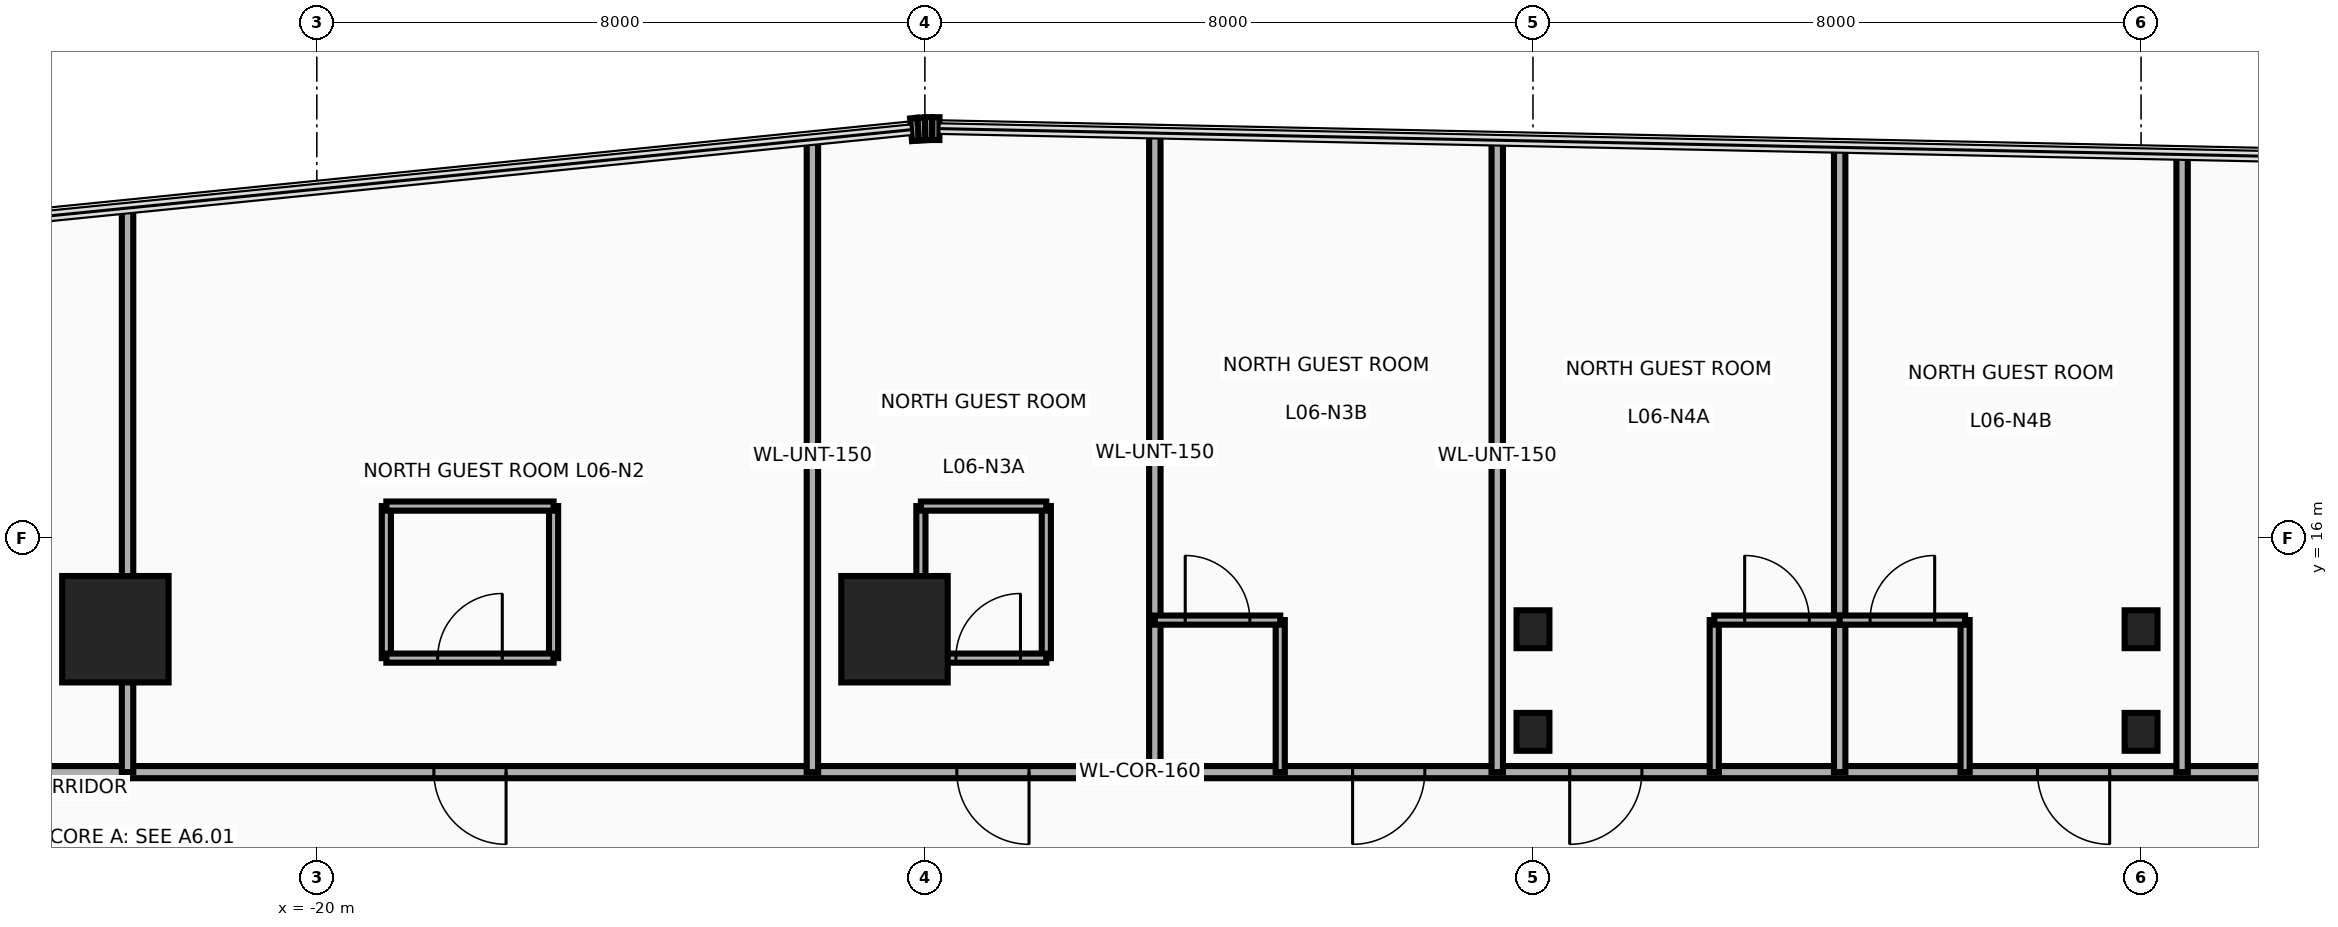
"""IFC4 building model, lengths in metres.
Left out: names, types, materials, properties, quantities, classifications, styles, units other than length and angle.
Written with IfcOpenShell. Run it as: python <this file> out.ifc"""

import sys

from ifc_helpers import new_model, si_unit, direction, frame, frame_2d, origin, origin_2d, place, context, subcontext, project, spatial, rectangle, i_section, extrude, source, transform, mapped, element, fill, save


model = new_model("IFC4")
c1 = context("Model", 3, precision=1e-05, world=origin(), true_north=direction((0.0, 1.0)))
c2 = subcontext(c1, "Body", "Model", "MODEL_VIEW")
j1 = project(units=[si_unit("LENGTHUNIT", "METRE"), si_unit("PLANEANGLEUNIT", "RADIAN")], contexts=[c1])
p1 = place(None, origin())
s1 = spatial("IfcSite", under=j1, at=p1, CompositionType="ELEMENT")
p2 = place(p1, origin())
s2 = spatial("IfcBuilding", under=s1, at=p2, CompositionType="ELEMENT")
p3 = place(p2, frame((0.0, 0.0, 29.7)))
s3 = spatial("IfcBuildingStorey", under=s2, at=p3, CompositionType="ELEMENT", Elevation=29.7)
m1 = source(origin(), c2, "Body", "SweptSolid", [
    extrude(rectangle(XDim=1.4, YDim=1.4, at=origin_2d()), origin(), (0.0, 0.0, 1.0), 3.7),
])
for number, where, z_axis, x_axis in (
    (1, (-22.65, 14.8, 0.0), (0.0, 0.0, 1.0), (1.0, 0.0, 0.0)),
    (2, (-12.4, 14.8, 0.0), (0.0, 0.0, 1.0), (1.0, 0.0, 0.0)),
):
    element("IfcColumn", number, at=place(p3, frame(where, z_axis=z_axis, x_axis=x_axis)), inside=s3, PredefinedType="COLUMN", context=c2, shape_type="MappedRepresentation", body=[
        mapped(m1, transform((0.0, 0.0, 0.0), x_axis=(1.0, 0.0, 0.0), y_axis=(0.0, 1.0, 0.0), z_axis=(0.0, 0.0, 1.0), scale=1.0)),
    ])
m2 = source(origin(), c2, "Body", "SweptSolid", [
    extrude(i_section(OverallWidth=0.432, OverallDepth=0.498, WebThickness=0.056, FlangeThickness=0.089, at=origin_2d()), origin(), (0.0, 0.0, 1.0), 3.7),
])
for number, where, z_axis, x_axis in (
    (3, (-4.0, 13.45, 0.0), (0.0, 0.0, 1.0), (1.0, 0.0, 0.0)),
    (4, (-4.0, 14.8, 0.0), (0.0, 0.0, 1.0), (1.0, 0.0, 0.0)),
    (5, (4.0, 13.45, 0.0), (0.0, 0.0, 1.0), (1.0, 0.0, 0.0)),
    (6, (4.0, 14.8, 0.0), (0.0, 0.0, 1.0), (1.0, 0.0, 0.0)),
):
    element("IfcColumn", number, at=place(p3, frame(where, z_axis=z_axis, x_axis=x_axis)), inside=s3, PredefinedType="COLUMN", context=c2, shape_type="MappedRepresentation", body=[
        mapped(m2, transform((0.0, 0.0, 0.0), x_axis=(1.0, 0.0, 0.0), y_axis=(0.0, 1.0, 0.0), z_axis=(0.0, 0.0, 1.0), scale=1.0)),
    ])
p4 = place(p3, frame((-12.182, 21.371, 0.0), z_axis=(0.0, 0.0, 1.0), x_axis=(0.996527790842, 0.08326080759, 0.0)))
e7 = element("IfcWall", 7, at=p4, inside=s3, PredefinedType="SOLIDWALL", context=c2, shape_type="SweptSolid", body=[
    extrude(rectangle(XDim=0.094, YDim=0.3, at=frame_2d((0.047, 0.0))), origin(), (0.0, 0.0, 1.0), 3.46),
])
p5 = place(p3, frame((-12.088, 21.379, 0.0), z_axis=(0.0, 0.0, 1.0), x_axis=(0.998476480444, 0.055178963393, 0.0)))
e8 = element("IfcWall", 8, at=p5, inside=s3, PredefinedType="SOLIDWALL", context=c2, shape_type="SweptSolid", body=[
    extrude(rectangle(XDim=0.093, YDim=0.3, at=frame_2d((0.046, 0.0))), origin(), (0.0, 0.0, 1.0), 3.46),
])
p6 = place(p3, frame((-11.996, 21.384, 0.0), z_axis=(0.0, 0.0, 1.0), x_axis=(0.999722573757, 0.023553673204, 0.0)))
e9 = element("IfcWall", 9, at=p6, inside=s3, PredefinedType="SOLIDWALL", context=c2, shape_type="SweptSolid", body=[
    extrude(rectangle(XDim=0.093, YDim=0.3, at=frame_2d((0.047, 0.0))), origin(), (0.0, 0.0, 1.0), 3.46),
])
p7 = place(p3, frame((-11.902, 21.386, 0.0), z_axis=(0.0, 0.0, 1.0), x_axis=(0.999986507273, -0.005194735103, 0.0)))
e10 = element("IfcWall", 10, at=p7, inside=s3, PredefinedType="SOLIDWALL", context=c2, shape_type="SweptSolid", body=[
    extrude(rectangle(XDim=0.094, YDim=0.3, at=frame_2d((0.047, 0.0))), origin(), (0.0, 0.0, 1.0), 3.46),
])
p8 = place(p3, frame((-31.89, 12.92, 0.0), z_axis=(0.0, 0.0, 1.0), x_axis=(1.0, 0.0, 0.0)))
e11 = element("IfcWall", 11, at=p8, inside=s3, PredefinedType="PARTITIONING", context=c2, shape_type="SweptSolid", body=[
    extrude(rectangle(XDim=45.44, YDim=0.16, at=frame_2d((22.72, 0.0))), origin(), (0.0, 0.0, 1.0), 2.583),
])
p9 = place(p8, frame((4.225, 0.0, 0.0)))
e12 = element("IfcOpeningElement", 12, at=p9, cuts=e11, PredefinedType="OPENING", context=c2, shape_type="SweptSolid", body=[
    extrude(rectangle(XDim=0.95, YDim=2.15, at=frame_2d((0.475, 1.075))), frame((0.0, 0.095, 0.0), z_axis=(0.0, -1.0, 0.0), x_axis=(1.0, 0.0, 0.0)), (0.0, 0.0, 1.0), 0.19),
])
p10 = place(p8, frame((13.43, 0.0, 0.0)))
e13 = element("IfcOpeningElement", 13, at=p10, cuts=e11, PredefinedType="OPENING", context=c2, shape_type="SweptSolid", body=[
    extrude(rectangle(XDim=0.95, YDim=2.15, at=frame_2d((0.475, 1.075))), frame((0.0, 0.095, 0.0), z_axis=(0.0, -1.0, 0.0), x_axis=(1.0, 0.0, 0.0)), (0.0, 0.0, 1.0), 0.19),
])
p11 = place(p8, frame((20.31, 0.0, 0.0)))
e14 = element("IfcOpeningElement", 14, at=p11, cuts=e11, PredefinedType="OPENING", context=c2, shape_type="SweptSolid", body=[
    extrude(rectangle(XDim=0.95, YDim=2.15, at=frame_2d((0.475, 1.075))), frame((0.0, 0.095, 0.0), z_axis=(0.0, -1.0, 0.0), x_axis=(1.0, 0.0, 0.0)), (0.0, 0.0, 1.0), 0.19),
])
p12 = place(p8, frame((25.517, 0.0, 0.0)))
e15 = element("IfcOpeningElement", 15, at=p12, cuts=e11, PredefinedType="OPENING", context=c2, shape_type="SweptSolid", body=[
    extrude(rectangle(XDim=0.95, YDim=2.15, at=frame_2d((0.475, 1.075))), frame((0.0, 0.095, 0.0), z_axis=(0.0, -1.0, 0.0), x_axis=(1.0, 0.0, 0.0)), (0.0, 0.0, 1.0), 0.19),
])
p13 = place(p8, frame((28.373, 0.0, 0.0)))
e16 = element("IfcOpeningElement", 16, at=p13, cuts=e11, PredefinedType="OPENING", context=c2, shape_type="SweptSolid", body=[
    extrude(rectangle(XDim=0.95, YDim=2.15, at=frame_2d((0.475, 1.075))), frame((0.0, 0.095, 0.0), z_axis=(0.0, -1.0, 0.0), x_axis=(1.0, 0.0, 0.0)), (0.0, 0.0, 1.0), 0.19),
])
p14 = place(p8, frame((34.527, 0.0, 0.0)))
e17 = element("IfcOpeningElement", 17, at=p14, cuts=e11, PredefinedType="OPENING", context=c2, shape_type="SweptSolid", body=[
    extrude(rectangle(XDim=0.95, YDim=2.15, at=frame_2d((0.475, 1.075))), frame((0.0, 0.095, 0.0), z_axis=(0.0, -1.0, 0.0), x_axis=(1.0, 0.0, 0.0)), (0.0, 0.0, 1.0), 0.19),
])
p15 = place(p8, frame((39.36, 0.0, 0.0)))
e18 = element("IfcOpeningElement", 18, at=p15, cuts=e11, PredefinedType="OPENING", context=c2, shape_type="SweptSolid", body=[
    extrude(rectangle(XDim=0.95, YDim=2.15, at=frame_2d((0.475, 1.075))), frame((0.0, 0.095, 0.0), z_axis=(0.0, -1.0, 0.0), x_axis=(1.0, 0.0, 0.0)), (0.0, 0.0, 1.0), 0.19),
])
p16 = place(p3, frame((-22.49, 12.92, 0.0), z_axis=(0.0, 0.0, 1.0), x_axis=(0.0, 1.0, 0.0)))
e19 = element("IfcWall", 19, at=p16, inside=s3, PredefinedType="PARTITIONING", context=c2, shape_type="SweptSolid", body=[
    extrude(rectangle(XDim=7.421, YDim=0.15, at=frame_2d((3.71, 0.0))), origin(), (0.0, 0.0, 1.0), 2.583),
])
p17 = place(p3, frame((-13.48, 12.92, 0.0), z_axis=(0.0, 0.0, 1.0), x_axis=(0.0, 1.0, 0.0)))
e20 = element("IfcWall", 20, at=p17, inside=s3, PredefinedType="PARTITIONING", context=c2, shape_type="SweptSolid", body=[
    extrude(rectangle(XDim=8.322, YDim=0.15, at=frame_2d((4.161, 0.0))), origin(), (0.0, 0.0, 1.0), 2.583),
])
p18 = place(p3, frame((-4.47, 12.92, 0.0), z_axis=(0.0, 0.0, 1.0), x_axis=(0.0, 1.0, 0.0)))
e21 = element("IfcWall", 21, at=p18, inside=s3, PredefinedType="PARTITIONING", context=c2, shape_type="SweptSolid", body=[
    extrude(rectangle(XDim=8.313, YDim=0.15, at=frame_2d((4.157, 0.0))), origin(), (0.0, 0.0, 1.0), 2.583),
])
p19 = place(p3, frame((4.54, 12.92, 0.0), z_axis=(0.0, 0.0, 1.0), x_axis=(0.0, 1.0, 0.0)))
e22 = element("IfcWall", 22, at=p19, inside=s3, PredefinedType="PARTITIONING", context=c2, shape_type="SweptSolid", body=[
    extrude(rectangle(XDim=8.125, YDim=0.15, at=frame_2d((4.063, 0.0))), origin(), (0.0, 0.0, 1.0), 2.583),
])
for number, where, z_axis, x_axis in (
    (23, (-19.085, 14.42, 0.0), (0.0, 0.0, 1.0), (0.0, 1.0, 0.0)),
    (24, (-16.885, 14.42, 0.0), (0.0, 0.0, 1.0), (0.0, 1.0, 0.0)),
):
    element("IfcWall", number, at=place(p3, frame(where, z_axis=z_axis, x_axis=x_axis)), inside=s3, PredefinedType="PARTITIONING", context=c2, shape_type="SweptSolid", body=[
        extrude(rectangle(XDim=2.0, YDim=0.12, at=frame_2d((1.0, 0.0))), origin(), (0.0, 0.0, 1.0), 2.583),
    ])
p20 = place(p3, frame((-19.085, 16.42, 0.0), z_axis=(0.0, 0.0, 1.0), x_axis=(1.0, 0.0, 0.0)))
e25 = element("IfcWall", 25, at=p20, inside=s3, PredefinedType="PARTITIONING", context=c2, shape_type="SweptSolid", body=[
    extrude(rectangle(XDim=2.2, YDim=0.12, at=frame_2d((1.1, 0.0))), origin(), (0.0, 0.0, 1.0), 3.46),
])
p21 = place(p3, frame((-19.085, 14.42, 0.0), z_axis=(0.0, 0.0, 1.0), x_axis=(1.0, 0.0, 0.0)))
e26 = element("IfcWall", 26, at=p21, inside=s3, PredefinedType="PARTITIONING", context=c2, shape_type="SweptSolid", body=[
    extrude(rectangle(XDim=2.2, YDim=0.12, at=frame_2d((1.1, 0.0))), origin(), (0.0, 0.0, 1.0), 3.46),
])
p22 = place(p21, frame((0.675, 0.0, 0.0)))
e27 = element("IfcOpeningElement", 27, at=p22, cuts=e26, PredefinedType="OPENING", context=c2, shape_type="SweptSolid", body=[
    extrude(rectangle(XDim=0.85, YDim=2.1, at=frame_2d((0.425, 1.05))), frame((0.0, 0.075, 0.0), z_axis=(0.0, -1.0, 0.0), x_axis=(1.0, 0.0, 0.0)), (0.0, 0.0, 1.0), 0.15),
])
p23 = place(p3, frame((-8.975, 12.92, 0.0), z_axis=(0.0, 0.0, 1.0), x_axis=(0.0, 1.0, 0.0)))
e28 = element("IfcWall", 28, at=p23, inside=s3, PredefinedType="PARTITIONING", context=c2, shape_type="SweptSolid", body=[
    extrude(rectangle(XDim=8.407, YDim=0.15, at=frame_2d((4.204, 0.0))), origin(), (0.0, 0.0, 1.0), 2.583),
])
for number, where, z_axis, x_axis in (
    (29, (-12.052, 14.42, 0.0), (0.0, 0.0, 1.0), (0.0, 1.0, 0.0)),
    (30, (-10.403, 14.42, 0.0), (0.0, 0.0, 1.0), (0.0, 1.0, 0.0)),
):
    element("IfcWall", number, at=place(p3, frame(where, z_axis=z_axis, x_axis=x_axis)), inside=s3, PredefinedType="PARTITIONING", context=c2, shape_type="SweptSolid", body=[
        extrude(rectangle(XDim=2.0, YDim=0.12, at=frame_2d((1.0, 0.0))), origin(), (0.0, 0.0, 1.0), 2.583),
    ])
p24 = place(p3, frame((-12.052, 16.42, 0.0), z_axis=(0.0, 0.0, 1.0), x_axis=(1.0, 0.0, 0.0)))
e31 = element("IfcWall", 31, at=p24, inside=s3, PredefinedType="PARTITIONING", context=c2, shape_type="SweptSolid", body=[
    extrude(rectangle(XDim=1.65, YDim=0.12, at=frame_2d((0.825, 0.0))), origin(), (0.0, 0.0, 1.0), 3.46),
])
p25 = place(p3, frame((-12.052, 14.42, 0.0), z_axis=(0.0, 0.0, 1.0), x_axis=(1.0, 0.0, 0.0)))
e32 = element("IfcWall", 32, at=p25, inside=s3, PredefinedType="PARTITIONING", context=c2, shape_type="SweptSolid", body=[
    extrude(rectangle(XDim=1.65, YDim=0.12, at=frame_2d((0.825, 0.0))), origin(), (0.0, 0.0, 1.0), 3.46),
])
p26 = place(p25, frame((0.46, 0.0, 0.0)))
e33 = element("IfcOpeningElement", 33, at=p26, cuts=e32, PredefinedType="OPENING", context=c2, shape_type="SweptSolid", body=[
    extrude(rectangle(XDim=0.85, YDim=2.1, at=frame_2d((0.425, 1.05))), frame((0.0, 0.075, 0.0), z_axis=(0.0, -1.0, 0.0), x_axis=(1.0, 0.0, 0.0)), (0.0, 0.0, 1.0), 0.15),
])
p27 = place(p3, frame((-7.325, 12.92, 0.0), z_axis=(0.0, 0.0, 1.0), x_axis=(0.0, 1.0, 0.0)))
e34 = element("IfcWall", 34, at=p27, inside=s3, PredefinedType="PARTITIONING", context=c2, shape_type="SweptSolid", body=[
    extrude(rectangle(XDim=2.0, YDim=0.12, at=frame_2d((1.0, 0.0))), origin(), (0.0, 0.0, 1.0), 2.583),
])
p28 = place(p3, frame((-8.975, 14.92, 0.0), z_axis=(0.0, 0.0, 1.0), x_axis=(1.0, 0.0, 0.0)))
e35 = element("IfcWall", 35, at=p28, inside=s3, PredefinedType="PARTITIONING", context=c2, shape_type="SweptSolid", body=[
    extrude(rectangle(XDim=1.65, YDim=0.12, at=frame_2d((0.825, 0.0))), origin(), (0.0, 0.0, 1.0), 2.583),
])
p29 = place(p28, frame((0.4, 0.0, 0.0)))
e36 = element("IfcOpeningElement", 36, at=p29, cuts=e35, PredefinedType="OPENING", context=c2, shape_type="SweptSolid", body=[
    extrude(rectangle(XDim=0.85, YDim=2.1, at=frame_2d((0.425, 1.05))), frame((0.0, 0.075, 0.0), z_axis=(0.0, -1.0, 0.0), x_axis=(1.0, 0.0, 0.0)), (0.0, 0.0, 1.0), 0.15),
])
p30 = place(p3, frame((0.035, 12.92, 0.0), z_axis=(0.0, 0.0, 1.0), x_axis=(0.0, 1.0, 0.0)))
e37 = element("IfcWall", 37, at=p30, inside=s3, PredefinedType="PARTITIONING", context=c2, shape_type="SweptSolid", body=[
    extrude(rectangle(XDim=8.219, YDim=0.15, at=frame_2d((4.11, 0.0))), origin(), (0.0, 0.0, 1.0), 2.583),
])
p31 = place(p3, frame((-1.615, 12.92, 0.0), z_axis=(0.0, 0.0, 1.0), x_axis=(0.0, 1.0, 0.0)))
e38 = element("IfcWall", 38, at=p31, inside=s3, PredefinedType="PARTITIONING", context=c2, shape_type="SweptSolid", body=[
    extrude(rectangle(XDim=2.0, YDim=0.12, at=frame_2d((1.0, 0.0))), origin(), (0.0, 0.0, 1.0), 2.583),
])
p32 = place(p3, frame((-1.615, 14.92, 0.0), z_axis=(0.0, 0.0, 1.0), x_axis=(1.0, 0.0, 0.0)))
e39 = element("IfcWall", 39, at=p32, inside=s3, PredefinedType="PARTITIONING", context=c2, shape_type="SweptSolid", body=[
    extrude(rectangle(XDim=1.65, YDim=0.12, at=frame_2d((0.825, 0.0))), origin(), (0.0, 0.0, 1.0), 2.583),
])
p33 = place(p32, frame((0.4, 0.0, 0.0)))
e40 = element("IfcOpeningElement", 40, at=p33, cuts=e39, PredefinedType="OPENING", context=c2, shape_type="SweptSolid", body=[
    extrude(rectangle(XDim=0.85, YDim=2.1, at=frame_2d((0.425, 1.05))), frame((0.0, 0.075, 0.0), z_axis=(0.0, -1.0, 0.0), x_axis=(1.0, 0.0, 0.0)), (0.0, 0.0, 1.0), 0.15),
])
p34 = place(p3, frame((1.685, 12.92, 0.0), z_axis=(0.0, 0.0, 1.0), x_axis=(0.0, 1.0, 0.0)))
e41 = element("IfcWall", 41, at=p34, inside=s3, PredefinedType="PARTITIONING", context=c2, shape_type="SweptSolid", body=[
    extrude(rectangle(XDim=2.0, YDim=0.12, at=frame_2d((1.0, 0.0))), origin(), (0.0, 0.0, 1.0), 2.583),
])
p35 = place(p3, frame((0.035, 14.92, 0.0), z_axis=(0.0, 0.0, 1.0), x_axis=(1.0, 0.0, 0.0)))
e42 = element("IfcWall", 42, at=p35, inside=s3, PredefinedType="PARTITIONING", context=c2, shape_type="SweptSolid", body=[
    extrude(rectangle(XDim=1.65, YDim=0.12, at=frame_2d((0.825, 0.0))), origin(), (0.0, 0.0, 1.0), 2.583),
])
p36 = place(p35, frame((0.4, 0.0, 0.0)))
e43 = element("IfcOpeningElement", 43, at=p36, cuts=e42, PredefinedType="OPENING", context=c2, shape_type="SweptSolid", body=[
    extrude(rectangle(XDim=0.85, YDim=2.1, at=frame_2d((0.425, 1.05))), frame((0.0, 0.075, 0.0), z_axis=(0.0, -1.0, 0.0), x_axis=(1.0, 0.0, 0.0)), (0.0, 0.0, 1.0), 0.15),
])
p37 = place(p10, frame((0.95, 0.0, 0.0), z_axis=(0.0, 0.0, 1.0), x_axis=(-1.0, 0.0, 0.0)))
e44 = element("IfcDoor", 44, at=p37, inside=s3, OperationType="SINGLE_SWING_LEFT", PredefinedType="DOOR", context=c2, shape_type="SweptSolid", body=[
    extrude(rectangle(XDim=0.95, YDim=2.15, at=frame_2d((0.475, 1.075))), frame((0.0, 0.025, 0.0), z_axis=(0.0, -1.0, 0.0), x_axis=(1.0, 0.0, 0.0)), (0.0, 0.0, 1.0), 0.05),
])
fill(e13, e44)
p38 = place(p22, origin())
e45 = element("IfcDoor", 45, at=p38, inside=s3, OperationType="SINGLE_SWING_RIGHT", PredefinedType="DOOR", context=c2, shape_type="SweptSolid", body=[
    extrude(rectangle(XDim=0.85, YDim=2.1, at=frame_2d((0.425, 1.05))), frame((0.0, 0.025, 0.0), z_axis=(0.0, -1.0, 0.0), x_axis=(1.0, 0.0, 0.0)), (0.0, 0.0, 1.0), 0.05),
])
fill(e27, e45)
p39 = place(p11, frame((0.95, 0.0, 0.0), z_axis=(0.0, 0.0, 1.0), x_axis=(-1.0, 0.0, 0.0)))
e46 = element("IfcDoor", 46, at=p39, inside=s3, OperationType="SINGLE_SWING_LEFT", PredefinedType="DOOR", context=c2, shape_type="SweptSolid", body=[
    extrude(rectangle(XDim=0.95, YDim=2.15, at=frame_2d((0.475, 1.075))), frame((0.0, 0.025, 0.0), z_axis=(0.0, -1.0, 0.0), x_axis=(1.0, 0.0, 0.0)), (0.0, 0.0, 1.0), 0.05),
])
fill(e14, e46)
p40 = place(p26, origin())
e47 = element("IfcDoor", 47, at=p40, inside=s3, OperationType="SINGLE_SWING_RIGHT", PredefinedType="DOOR", context=c2, shape_type="SweptSolid", body=[
    extrude(rectangle(XDim=0.85, YDim=2.1, at=frame_2d((0.425, 1.05))), frame((0.0, 0.025, 0.0), z_axis=(0.0, -1.0, 0.0), x_axis=(1.0, 0.0, 0.0)), (0.0, 0.0, 1.0), 0.05),
])
fill(e33, e47)
p41 = place(p12, frame((0.95, 0.0, 0.0), z_axis=(0.0, 0.0, 1.0), x_axis=(-1.0, 0.0, 0.0)))
e48 = element("IfcDoor", 48, at=p41, inside=s3, OperationType="SINGLE_SWING_LEFT", PredefinedType="DOOR", context=c2, shape_type="SweptSolid", body=[
    extrude(rectangle(XDim=0.95, YDim=2.15, at=frame_2d((0.475, 1.075))), frame((0.0, 0.025, 0.0), z_axis=(0.0, -1.0, 0.0), x_axis=(1.0, 0.0, 0.0)), (0.0, 0.0, 1.0), 0.05),
])
fill(e15, e48)
p42 = place(p29, origin())
e49 = element("IfcDoor", 49, at=p42, inside=s3, OperationType="SINGLE_SWING_RIGHT", PredefinedType="DOOR", context=c2, shape_type="SweptSolid", body=[
    extrude(rectangle(XDim=0.85, YDim=2.1, at=frame_2d((0.425, 1.05))), frame((0.0, 0.025, 0.0), z_axis=(0.0, -1.0, 0.0), x_axis=(1.0, 0.0, 0.0)), (0.0, 0.0, 1.0), 0.05),
])
fill(e36, e49)
p43 = place(p13, frame((0.95, 0.0, 0.0), z_axis=(0.0, 0.0, 1.0), x_axis=(-1.0, 0.0, 0.0)))
e50 = element("IfcDoor", 50, at=p43, inside=s3, OperationType="SINGLE_SWING_LEFT", PredefinedType="DOOR", context=c2, shape_type="SweptSolid", body=[
    extrude(rectangle(XDim=0.95, YDim=2.15, at=frame_2d((0.475, 1.075))), frame((0.0, 0.025, 0.0), z_axis=(0.0, -1.0, 0.0), x_axis=(1.0, 0.0, 0.0)), (0.0, 0.0, 1.0), 0.05),
])
fill(e16, e50)
p44 = place(p33, origin())
e51 = element("IfcDoor", 51, at=p44, inside=s3, OperationType="SINGLE_SWING_RIGHT", PredefinedType="DOOR", context=c2, shape_type="SweptSolid", body=[
    extrude(rectangle(XDim=0.85, YDim=2.1, at=frame_2d((0.425, 1.05))), frame((0.0, 0.025, 0.0), z_axis=(0.0, -1.0, 0.0), x_axis=(1.0, 0.0, 0.0)), (0.0, 0.0, 1.0), 0.05),
])
fill(e40, e51)
p45 = place(p14, frame((0.95, 0.0, 0.0), z_axis=(0.0, 0.0, 1.0), x_axis=(-1.0, 0.0, 0.0)))
e52 = element("IfcDoor", 52, at=p45, inside=s3, OperationType="SINGLE_SWING_LEFT", PredefinedType="DOOR", context=c2, shape_type="SweptSolid", body=[
    extrude(rectangle(XDim=0.95, YDim=2.15, at=frame_2d((0.475, 1.075))), frame((0.0, 0.025, 0.0), z_axis=(0.0, -1.0, 0.0), x_axis=(1.0, 0.0, 0.0)), (0.0, 0.0, 1.0), 0.05),
])
fill(e17, e52)
p46 = place(p36, origin())
e53 = element("IfcDoor", 53, at=p46, inside=s3, OperationType="SINGLE_SWING_RIGHT", PredefinedType="DOOR", context=c2, shape_type="SweptSolid", body=[
    extrude(rectangle(XDim=0.85, YDim=2.1, at=frame_2d((0.425, 1.05))), frame((0.0, 0.025, 0.0), z_axis=(0.0, -1.0, 0.0), x_axis=(1.0, 0.0, 0.0)), (0.0, 0.0, 1.0), 0.05),
])
fill(e43, e53)
save(model, sys.argv[1])
